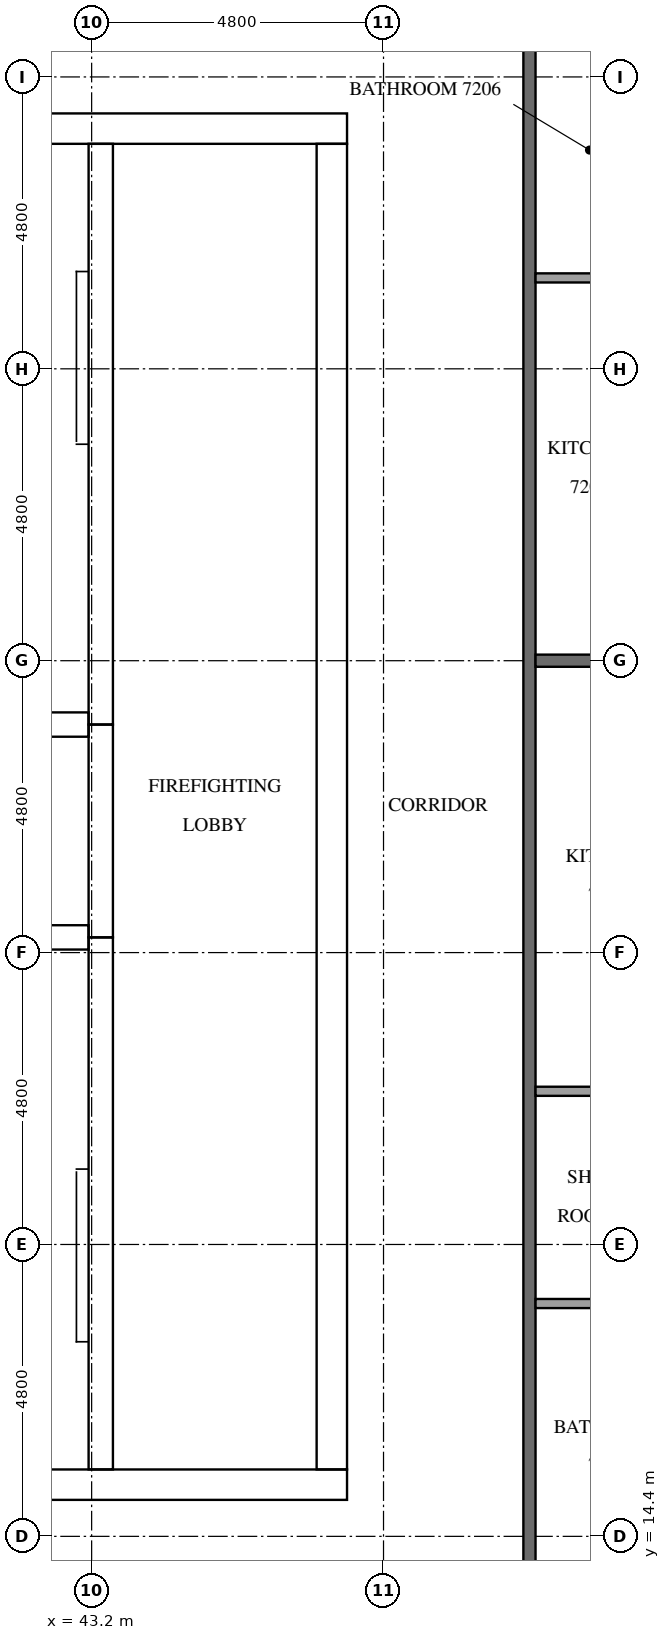
"""IFC4 building model, lengths in metres.
Left out: names, types, materials, properties, quantities, classifications, styles, units other than length and angle.
Written with IfcOpenShell. Run it as: python <this file> out.ifc"""

import sys

from ifc_helpers import new_model, si_unit, direction, frame, frame_2d, origin, place, context, subcontext, project, spatial, rectangle, extrude, element, fill, save


model = new_model("IFC4")
c1 = context("Model", 3, precision=1e-05, world=origin(), true_north=direction((0.0, 1.0)))
c2 = subcontext(c1, "Body", "Model", "MODEL_VIEW")
j1 = project(units=[si_unit("LENGTHUNIT", "METRE"), si_unit("PLANEANGLEUNIT", "RADIAN")], contexts=[c1])
p1 = place(None, origin())
s1 = spatial("IfcSite", under=j1, at=p1, CompositionType="ELEMENT")
p2 = place(p1, origin())
s2 = spatial("IfcBuilding", under=s1, at=p2, CompositionType="ELEMENT")
p3 = place(p2, frame((0.0, 0.0, 275.6)))
s3 = spatial("IfcBuildingStorey", under=s2, at=p3, CompositionType="ELEMENT", Elevation=275.6)
p4 = place(p3, frame((15.0, 15.25, 0.0), z_axis=(0.0, 0.0, 1.0), x_axis=(1.0, 0.0, 0.0)))
e1 = element("IfcWall", 1, at=p4, inside=s3, PredefinedType="SHEAR", context=c2, shape_type="SweptSolid", body=[
    extrude(rectangle(XDim=32.4, YDim=0.5, at=frame_2d((16.2, 0.0))), origin(), (0.0, 0.0, 1.0), 3.2),
])
p5 = place(p4, frame((15.3, 0.0, 0.0)))
e2 = element("IfcOpeningElement", 2, at=p5, cuts=e1, PredefinedType="OPENING", context=c2, shape_type="SweptSolid", body=[
    extrude(rectangle(XDim=1.8, YDim=2.1, at=frame_2d((0.9, 1.05))), frame((0.0, 0.26, 0.0), z_axis=(0.0, -1.0, 0.0), x_axis=(1.0, 0.0, 0.0)), (0.0, 0.0, 1.0), 0.52),
])
p6 = place(p3, frame((15.0, 37.55, 0.0), z_axis=(0.0, 0.0, 1.0), x_axis=(1.0, 0.0, 0.0)))
e3 = element("IfcWall", 3, at=p6, inside=s3, PredefinedType="SHEAR", context=c2, shape_type="SweptSolid", body=[
    extrude(rectangle(XDim=32.4, YDim=0.5, at=frame_2d((16.2, 0.0))), origin(), (0.0, 0.0, 1.0), 3.2),
])
p7 = place(p6, frame((15.3, 0.0, 0.0)))
e4 = element("IfcOpeningElement", 4, at=p7, cuts=e3, PredefinedType="OPENING", context=c2, shape_type="SweptSolid", body=[
    extrude(rectangle(XDim=1.8, YDim=2.1, at=frame_2d((0.9, 1.05))), frame((0.0, 0.26, 0.0), z_axis=(0.0, -1.0, 0.0), x_axis=(1.0, 0.0, 0.0)), (0.0, 0.0, 1.0), 0.52),
])
p8 = place(p6, frame((1.282, 0.0, 0.0)))
e5 = element("IfcOpeningElement", 5, at=p8, cuts=e3, PredefinedType="OPENING", context=c2, shape_type="SweptSolid", body=[
    extrude(rectangle(XDim=1.0, YDim=2.1, at=frame_2d((0.5, 1.05))), frame((0.0, 0.26, 0.0), z_axis=(0.0, -1.0, 0.0), x_axis=(1.0, 0.0, 0.0)), (0.0, 0.0, 1.0), 0.52),
])
p9 = place(p6, frame((5.082, 0.0, 0.0)))
e6 = element("IfcOpeningElement", 6, at=p9, cuts=e3, PredefinedType="OPENING", context=c2, shape_type="SweptSolid", body=[
    extrude(rectangle(XDim=1.0, YDim=2.1, at=frame_2d((0.5, 1.05))), frame((0.0, 0.26, 0.0), z_axis=(0.0, -1.0, 0.0), x_axis=(1.0, 0.0, 0.0)), (0.0, 0.0, 1.0), 0.52),
])
p10 = place(p3, frame((47.15, 15.5, 0.0), z_axis=(0.0, 0.0, 1.0), x_axis=(0.0, 1.0, 0.0)))
e7 = element("IfcWall", 7, at=p10, inside=s3, PredefinedType="SHEAR", context=c2, shape_type="SweptSolid", body=[
    extrude(rectangle(XDim=21.8, YDim=0.5, at=frame_2d((10.9, 0.0))), origin(), (0.0, 0.0, 1.0), 3.2),
])
p11 = place(p10, frame((10.6, 0.0, 0.0)))
e8 = element("IfcOpeningElement", 8, at=p11, cuts=e7, PredefinedType="OPENING", context=c2, shape_type="SweptSolid", body=[
    extrude(rectangle(XDim=1.2, YDim=2.1, at=frame_2d((0.6, 1.05))), frame((0.0, 0.26, 0.0), z_axis=(0.0, -1.0, 0.0), x_axis=(1.0, 0.0, 0.0)), (0.0, 0.0, 1.0), 0.52),
])
p12 = place(p3, frame((43.35, 15.5, 0.0), z_axis=(0.0, 0.0, 1.0), x_axis=(0.0, 1.0, 0.0)))
e9 = element("IfcWall", 9, at=p12, inside=s3, PredefinedType="SHEAR", context=c2, shape_type="SweptSolid", body=[
    extrude(rectangle(XDim=8.75, YDim=0.4, at=frame_2d((4.375, 0.0))), origin(), (0.0, 0.0, 1.0), 3.2),
])
p13 = place(p12, frame((0.7, 0.0, 0.0)))
e10 = element("IfcOpeningElement", 10, at=p13, cuts=e9, PredefinedType="OPENING", context=c2, shape_type="SweptSolid", body=[
    extrude(rectangle(XDim=1.2, YDim=2.1, at=frame_2d((0.6, 1.05))), frame((0.0, 0.21, 0.0), z_axis=(0.0, -1.0, 0.0), x_axis=(1.0, 0.0, 0.0)), (0.0, 0.0, 1.0), 0.42),
])
p14 = place(p3, frame((43.35, 24.25, 0.0), z_axis=(0.0, 0.0, 1.0), x_axis=(0.0, 1.0, 0.0)))
e11 = element("IfcWall", 11, at=p14, inside=s3, PredefinedType="SHEAR", context=c2, shape_type="SweptSolid", body=[
    extrude(rectangle(XDim=3.5, YDim=0.4, at=frame_2d((1.75, 0.0))), origin(), (0.0, 0.0, 1.0), 3.2),
])
p15 = place(p14, frame((1.2, 0.0, 0.0)))
e12 = element("IfcOpeningElement", 12, at=p15, cuts=e11, PredefinedType="OPENING", context=c2, shape_type="SweptSolid", body=[
    extrude(rectangle(XDim=1.1, YDim=2.1, at=frame_2d((0.55, 1.05))), frame((0.0, 0.21, 0.0), z_axis=(0.0, -1.0, 0.0), x_axis=(1.0, 0.0, 0.0)), (0.0, 0.0, 1.0), 0.42),
])
p16 = place(p3, frame((43.35, 27.75, 0.0), z_axis=(0.0, 0.0, 1.0), x_axis=(0.0, 1.0, 0.0)))
e13 = element("IfcWall", 13, at=p16, inside=s3, PredefinedType="SHEAR", context=c2, shape_type="SweptSolid", body=[
    extrude(rectangle(XDim=9.55, YDim=0.4, at=frame_2d((4.775, 0.0))), origin(), (0.0, 0.0, 1.0), 3.2),
])
p17 = place(p16, frame((7.65, 0.0, 0.0)))
e14 = element("IfcOpeningElement", 14, at=p17, cuts=e13, PredefinedType="OPENING", context=c2, shape_type="SweptSolid", body=[
    extrude(rectangle(XDim=1.2, YDim=2.1, at=frame_2d((0.6, 1.05))), frame((0.0, 0.21, 0.0), z_axis=(0.0, -1.0, 0.0), x_axis=(1.0, 0.0, 0.0)), (0.0, 0.0, 1.0), 0.42),
])
for number, where, z_axis, x_axis in (
    (15, (39.5, 24.25, 0.0), (0.0, 0.0, 1.0), (1.0, 0.0, 0.0)),
    (16, (39.5, 27.75, 0.0), (0.0, 0.0, 1.0), (1.0, 0.0, 0.0)),
):
    element("IfcWall", number, at=place(p3, frame(where, z_axis=z_axis, x_axis=x_axis)), inside=s3, PredefinedType="SHEAR", context=c2, shape_type="SweptSolid", body=[
        extrude(rectangle(XDim=3.65, YDim=0.4, at=frame_2d((1.825, 0.0))), origin(), (0.0, 0.0, 1.0), 3.2),
    ])
p18 = place(p3, frame((50.4, 40.7, 0.0), z_axis=(0.0, 0.0, 1.0), x_axis=(0.0, -1.0, 0.0)))
e17 = element("IfcWall", 17, at=p18, inside=s3, PredefinedType="PARTITIONING", context=c2, shape_type="SweptSolid", body=[
    extrude(rectangle(XDim=28.6, YDim=0.2, at=frame_2d((14.3, 0.0))), origin(), (0.0, 0.0, 1.0), 3.2),
])
p19 = place(p18, frame((27.425, 0.0, 0.0)))
e18 = element("IfcOpeningElement", 18, at=p19, cuts=e17, PredefinedType="OPENING", context=c2, shape_type="SweptSolid", body=[
    extrude(rectangle(XDim=1.0, YDim=2.1, at=frame_2d((0.5, 1.05))), frame((0.0, 0.11, 0.0), z_axis=(0.0, -1.0, 0.0), x_axis=(1.0, 0.0, 0.0)), (0.0, 0.0, 1.0), 0.22),
])
p20 = place(p18, frame((0.175, 0.0, 0.0)))
e19 = element("IfcOpeningElement", 19, at=p20, cuts=e17, PredefinedType="OPENING", context=c2, shape_type="SweptSolid", body=[
    extrude(rectangle(XDim=1.0, YDim=2.1, at=frame_2d((0.5, 1.05))), frame((0.0, 0.11, 0.0), z_axis=(0.0, -1.0, 0.0), x_axis=(1.0, 0.0, 0.0)), (0.0, 0.0, 1.0), 0.22),
])
p21 = place(p3, frame((50.5, 28.8, 0.0), z_axis=(0.0, 0.0, 1.0), x_axis=(1.0, 0.0, 0.0)))
e20 = element("IfcWall", 20, at=p21, inside=s3, PredefinedType="PARTITIONING", context=c2, shape_type="SweptSolid", body=[
    extrude(rectangle(XDim=7.0, YDim=0.2, at=frame_2d((3.5, 0.0))), origin(), (0.0, 0.0, 1.0), 3.2),
])
for number, where, z_axis, x_axis in (
    (21, (50.5, 18.229, 0.0), (0.0, 0.0, 1.0), (1.0, 0.0, 0.0)),
    (22, (50.5, 21.719, 0.0), (0.0, 0.0, 1.0), (1.0, 0.0, 0.0)),
):
    element("IfcWall", number, at=place(p3, frame(where, z_axis=z_axis, x_axis=x_axis)), inside=s3, PredefinedType="PARTITIONING", context=c2, shape_type="SweptSolid", body=[
        extrude(rectangle(XDim=2.375, YDim=0.15, at=frame_2d((1.188, 0.0))), origin(), (0.0, 0.0, 1.0), 3.2),
    ])
p22 = place(p3, frame((50.5, 35.095, 0.0), z_axis=(0.0, 0.0, 1.0), x_axis=(1.0, 0.0, 0.0)))
e23 = element("IfcWall", 23, at=p22, inside=s3, PredefinedType="PARTITIONING", context=c2, shape_type="SweptSolid", body=[
    extrude(rectangle(XDim=1.775, YDim=0.15, at=frame_2d((0.887, 0.0))), origin(), (0.0, 0.0, 1.0), 3.2),
])
p23 = place(p15, origin())
e24 = element("IfcDoor", 24, at=p23, inside=s3, OperationType="DOUBLE_DOOR_SLIDING", PredefinedType="DOOR", context=c2, shape_type="SweptSolid", body=[
    extrude(rectangle(XDim=1.1, YDim=2.1, at=frame_2d((0.55, 1.05))), frame((0.0, 0.025, 0.0), z_axis=(0.0, -1.0, 0.0), x_axis=(1.0, 0.0, 0.0)), (0.0, 0.0, 1.0), 0.05),
])
fill(e12, e24)
p24 = place(p13, origin())
e25 = element("IfcDoor", 25, at=p24, inside=s3, OperationType="SINGLE_SWING_LEFT", PredefinedType="DOOR", context=c2, shape_type="SweptSolid", body=[
    extrude(rectangle(XDim=1.2, YDim=2.1, at=frame_2d((0.6, 1.05))), frame((0.0, 0.025, 0.0), z_axis=(0.0, -1.0, 0.0), x_axis=(1.0, 0.0, 0.0)), (0.0, 0.0, 1.0), 0.05),
])
fill(e10, e25)
p25 = place(p17, origin())
e26 = element("IfcDoor", 26, at=p25, inside=s3, OperationType="SINGLE_SWING_RIGHT", PredefinedType="DOOR", context=c2, shape_type="SweptSolid", body=[
    extrude(rectangle(XDim=1.2, YDim=2.1, at=frame_2d((0.6, 1.05))), frame((0.0, 0.025, 0.0), z_axis=(0.0, -1.0, 0.0), x_axis=(1.0, 0.0, 0.0)), (0.0, 0.0, 1.0), 0.05),
])
fill(e14, e26)
p26 = place(p11, origin())
e27 = element("IfcDoor", 27, at=p26, inside=s3, OperationType="SINGLE_SWING_RIGHT", PredefinedType="DOOR", context=c2, shape_type="SweptSolid", body=[
    extrude(rectangle(XDim=1.2, YDim=2.1, at=frame_2d((0.6, 1.05))), frame((0.0, 0.025, 0.0), z_axis=(0.0, -1.0, 0.0), x_axis=(1.0, 0.0, 0.0)), (0.0, 0.0, 1.0), 0.05),
])
fill(e8, e27)
save(model, sys.argv[1])
